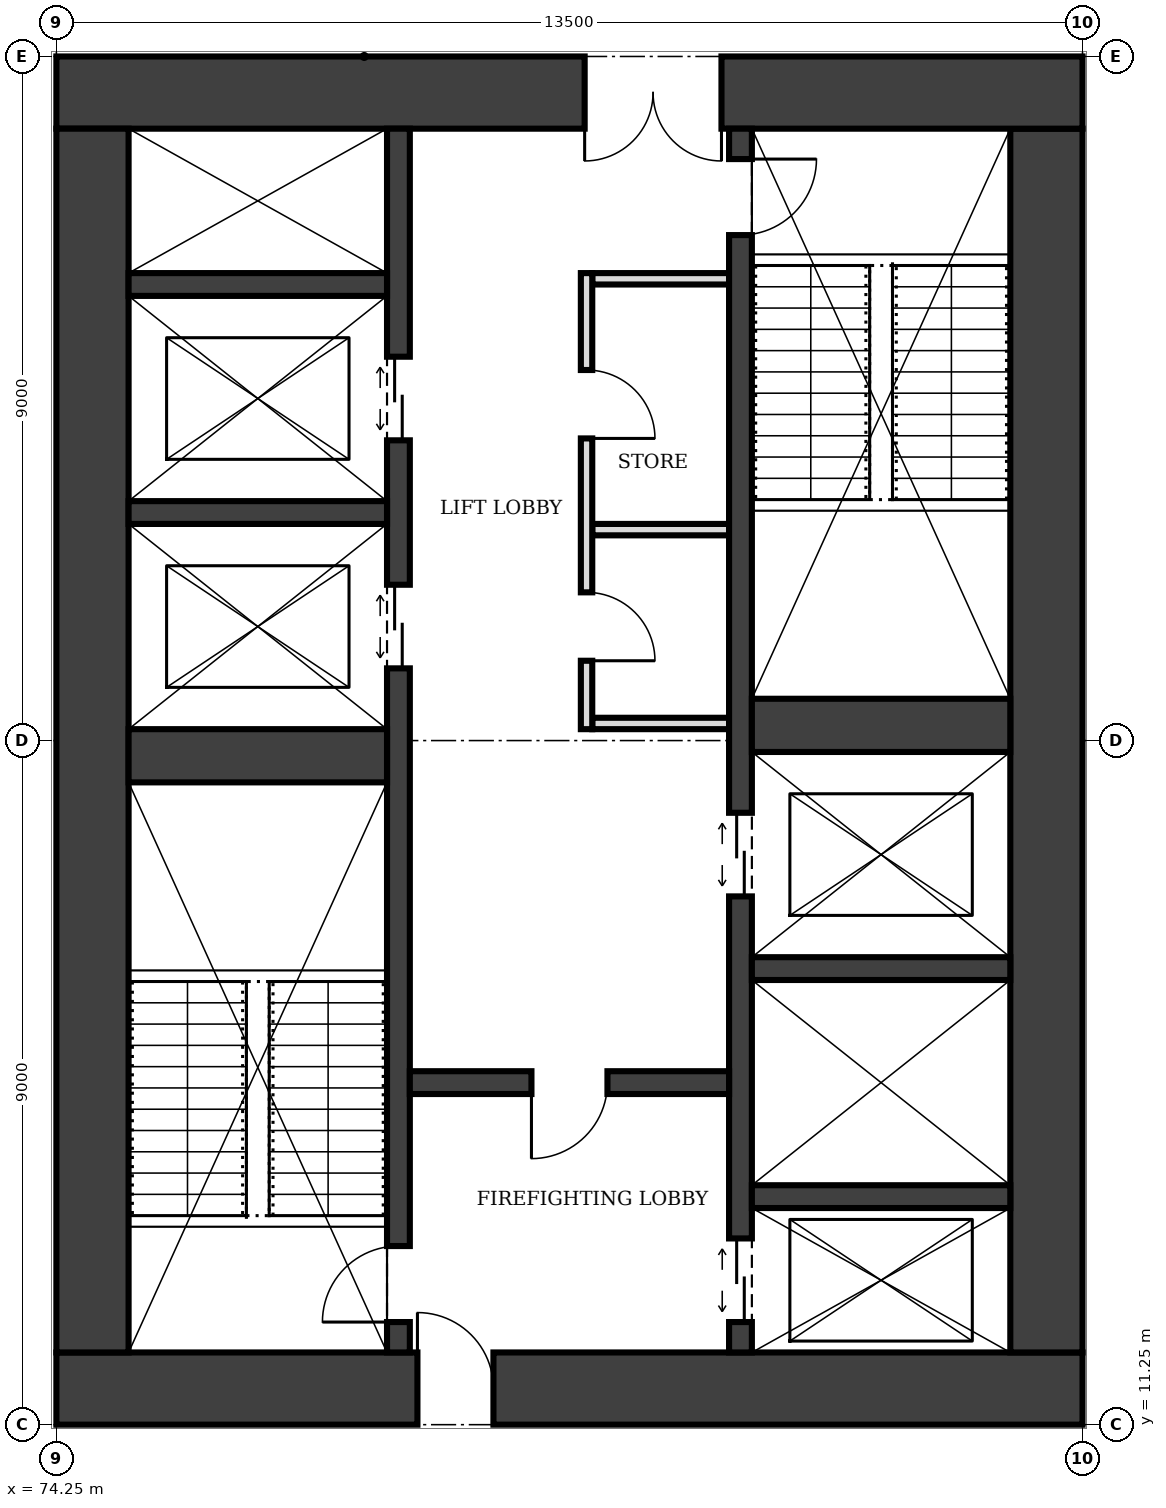
"""IFC4 building model, lengths in metres.
Left out: names, types, materials, properties, quantities, classifications, styles, units other than length and angle.
Written with IfcOpenShell. Run it as: python <this file> out.ifc"""

import sys

from ifc_helpers import new_model, si_unit, direction, frame, frame_2d, origin, place, context, subcontext, project, spatial, rectangle, extrude, element, fill, save


model = new_model("IFC4")
c1 = context("Model", 3, precision=1e-05, world=origin(), true_north=direction((0.0, 1.0)))
c2 = subcontext(c1, "Body", "Model", "MODEL_VIEW")
j1 = project(units=[si_unit("LENGTHUNIT", "METRE"), si_unit("PLANEANGLEUNIT", "RADIAN")], contexts=[c1])
p1 = place(None, origin())
s1 = spatial("IfcSite", under=j1, at=p1, CompositionType="ELEMENT")
p2 = place(p1, origin())
s2 = spatial("IfcBuilding", under=s1, at=p2, CompositionType="ELEMENT")
p3 = place(p2, frame((0.0, 0.0, 25.0)))
s3 = spatial("IfcBuildingStorey", under=s2, at=p3, CompositionType="ELEMENT", Elevation=25.0)
p4 = place(p3, frame((74.25, 11.725, 0.0), z_axis=(0.0, 0.0, 1.0), x_axis=(1.0, 0.0, 0.0)))
e1 = element("IfcWall", 1, at=p4, inside=s3, PredefinedType="SHEAR", context=c2, shape_type="SweptSolid", body=[
    extrude(rectangle(XDim=13.5, YDim=0.95, at=frame_2d((6.75, 0.0))), origin(), (0.0, 0.0, 1.0), 4.0),
])
p5 = place(p4, frame((4.75, 0.0, 0.0)))
e2 = element("IfcOpeningElement", 2, at=p5, cuts=e1, PredefinedType="OPENING", context=c2, shape_type="SweptSolid", body=[
    extrude(rectangle(XDim=1.0, YDim=2.1, at=frame_2d((0.5, 1.05))), frame((0.0, 0.485, 0.0), z_axis=(0.0, -1.0, 0.0), x_axis=(1.0, 0.0, 0.0)), (0.0, 0.0, 1.0), 0.97),
])
p6 = place(p3, frame((87.275, 12.2, 0.0), z_axis=(0.0, 0.0, 1.0), x_axis=(0.0, 1.0, 0.0)))
e3 = element("IfcWall", 3, at=p6, inside=s3, PredefinedType="SHEAR", context=c2, shape_type="SweptSolid", body=[
    extrude(rectangle(XDim=16.1, YDim=0.95, at=frame_2d((8.05, 0.0))), origin(), (0.0, 0.0, 1.0), 4.0),
])
p7 = place(p3, frame((87.75, 28.775, 0.0), z_axis=(0.0, 0.0, 1.0), x_axis=(-1.0, 0.0, 0.0)))
e4 = element("IfcWall", 4, at=p7, inside=s3, PredefinedType="SHEAR", context=c2, shape_type="SweptSolid", body=[
    extrude(rectangle(XDim=13.5, YDim=0.95, at=frame_2d((6.75, 0.0))), origin(), (0.0, 0.0, 1.0), 4.0),
])
p8 = place(p7, frame((4.75, 0.0, 0.0)))
e5 = element("IfcOpeningElement", 5, at=p8, cuts=e4, PredefinedType="OPENING", context=c2, shape_type="SweptSolid", body=[
    extrude(rectangle(XDim=1.8, YDim=2.1, at=frame_2d((0.9, 1.05))), frame((0.0, 0.485, 0.0), z_axis=(0.0, -1.0, 0.0), x_axis=(1.0, 0.0, 0.0)), (0.0, 0.0, 1.0), 0.97),
])
p9 = place(p3, frame((74.725, 28.3, 0.0), z_axis=(0.0, 0.0, 1.0), x_axis=(0.0, -1.0, 0.0)))
e6 = element("IfcWall", 6, at=p9, inside=s3, PredefinedType="SHEAR", context=c2, shape_type="SweptSolid", body=[
    extrude(rectangle(XDim=16.1, YDim=0.95, at=frame_2d((8.05, 0.0))), origin(), (0.0, 0.0, 1.0), 4.0),
])
p10 = place(p3, frame((78.75, 12.2, 0.0), z_axis=(0.0, 0.0, 1.0), x_axis=(0.0, 1.0, 0.0)))
e7 = element("IfcWall", 7, at=p10, inside=s3, PredefinedType="SHEAR", context=c2, shape_type="SweptSolid", body=[
    extrude(rectangle(XDim=16.1, YDim=0.3, at=frame_2d((8.05, 0.0))), origin(), (0.0, 0.0, 1.0), 4.0),
])
p11 = place(p10, frame((0.4, 0.0, 0.0)))
e8 = element("IfcOpeningElement", 8, at=p11, cuts=e7, PredefinedType="OPENING", context=c2, shape_type="SweptSolid", body=[
    extrude(rectangle(XDim=1.0, YDim=2.1, at=frame_2d((0.5, 1.05))), frame((0.0, 0.16, 0.0), z_axis=(0.0, -1.0, 0.0), x_axis=(1.0, 0.0, 0.0)), (0.0, 0.0, 1.0), 0.32),
])
p12 = place(p10, frame((9.0, 0.0, 0.0)))
e9 = element("IfcOpeningElement", 9, at=p12, cuts=e7, PredefinedType="OPENING", context=c2, shape_type="SweptSolid", body=[
    extrude(rectangle(XDim=1.1, YDim=2.1, at=frame_2d((0.55, 1.05))), frame((0.0, 0.16, 0.0), z_axis=(0.0, -1.0, 0.0), x_axis=(1.0, 0.0, 0.0)), (0.0, 0.0, 1.0), 0.32),
])
p13 = place(p10, frame((12.0, 0.0, 0.0)))
e10 = element("IfcOpeningElement", 10, at=p13, cuts=e7, PredefinedType="OPENING", context=c2, shape_type="SweptSolid", body=[
    extrude(rectangle(XDim=1.1, YDim=2.1, at=frame_2d((0.55, 1.05))), frame((0.0, 0.16, 0.0), z_axis=(0.0, -1.0, 0.0), x_axis=(1.0, 0.0, 0.0)), (0.0, 0.0, 1.0), 0.32),
])
p14 = place(p3, frame((83.25, 12.2, 0.0), z_axis=(0.0, 0.0, 1.0), x_axis=(0.0, 1.0, 0.0)))
e11 = element("IfcWall", 11, at=p14, inside=s3, PredefinedType="SHEAR", context=c2, shape_type="SweptSolid", body=[
    extrude(rectangle(XDim=16.1, YDim=0.3, at=frame_2d((8.05, 0.0))), origin(), (0.0, 0.0, 1.0), 4.0),
])
p15 = place(p14, frame((14.7, 0.0, 0.0)))
e12 = element("IfcOpeningElement", 12, at=p15, cuts=e11, PredefinedType="OPENING", context=c2, shape_type="SweptSolid", body=[
    extrude(rectangle(XDim=1.0, YDim=2.1, at=frame_2d((0.5, 1.05))), frame((0.0, 0.16, 0.0), z_axis=(0.0, -1.0, 0.0), x_axis=(1.0, 0.0, 0.0)), (0.0, 0.0, 1.0), 0.32),
])
p16 = place(p14, frame((0.4, 0.0, 0.0)))
e13 = element("IfcOpeningElement", 13, at=p16, cuts=e11, PredefinedType="OPENING", context=c2, shape_type="SweptSolid", body=[
    extrude(rectangle(XDim=1.1, YDim=2.1, at=frame_2d((0.55, 1.05))), frame((0.0, 0.16, 0.0), z_axis=(0.0, -1.0, 0.0), x_axis=(1.0, 0.0, 0.0)), (0.0, 0.0, 1.0), 0.32),
])
p17 = place(p14, frame((6.0, 0.0, 0.0)))
e14 = element("IfcOpeningElement", 14, at=p17, cuts=e11, PredefinedType="OPENING", context=c2, shape_type="SweptSolid", body=[
    extrude(rectangle(XDim=1.1, YDim=2.1, at=frame_2d((0.55, 1.05))), frame((0.0, 0.16, 0.0), z_axis=(0.0, -1.0, 0.0), x_axis=(1.0, 0.0, 0.0)), (0.0, 0.0, 1.0), 0.32),
])
p18 = place(p3, frame((75.2, 20.05, 0.0), z_axis=(0.0, 0.0, 1.0), x_axis=(1.0, 0.0, 0.0)))
e15 = element("IfcWall", 15, at=p18, inside=s3, PredefinedType="SHEAR", context=c2, shape_type="SweptSolid", body=[
    extrude(rectangle(XDim=3.4, YDim=0.7, at=frame_2d((1.7, 0.0))), origin(), (0.0, 0.0, 1.0), 4.0),
])
p19 = place(p3, frame((78.9, 15.75, 0.0), z_axis=(0.0, 0.0, 1.0), x_axis=(1.0, 0.0, 0.0)))
e16 = element("IfcWall", 16, at=p19, inside=s3, PredefinedType="SHEAR", context=c2, shape_type="SweptSolid", body=[
    extrude(rectangle(XDim=4.2, YDim=0.3, at=frame_2d((2.1, 0.0))), origin(), (0.0, 0.0, 1.0), 4.0),
])
p20 = place(p19, frame((1.6, 0.0, 0.0)))
e17 = element("IfcOpeningElement", 17, at=p20, cuts=e16, PredefinedType="OPENING", context=c2, shape_type="SweptSolid", body=[
    extrude(rectangle(XDim=1.0, YDim=2.1, at=frame_2d((0.5, 1.05))), frame((0.0, 0.16, 0.0), z_axis=(0.0, -1.0, 0.0), x_axis=(1.0, 0.0, 0.0)), (0.0, 0.0, 1.0), 0.32),
])
for number, where, z_axis, x_axis in (
    (18, (83.4, 14.25, 0.0), (0.0, 0.0, 1.0), (1.0, 0.0, 0.0)),
    (19, (83.4, 17.25, 0.0), (0.0, 0.0, 1.0), (1.0, 0.0, 0.0)),
):
    element("IfcWall", number, at=place(p3, frame(where, z_axis=z_axis, x_axis=x_axis)), inside=s3, PredefinedType="SHEAR", context=c2, shape_type="SweptSolid", body=[
        extrude(rectangle(XDim=3.4, YDim=0.3, at=frame_2d((1.7, 0.0))), origin(), (0.0, 0.0, 1.0), 4.0),
    ])
p21 = place(p3, frame((83.4, 20.45, 0.0), z_axis=(0.0, 0.0, 1.0), x_axis=(1.0, 0.0, 0.0)))
e20 = element("IfcWall", 20, at=p21, inside=s3, PredefinedType="SHEAR", context=c2, shape_type="SweptSolid", body=[
    extrude(rectangle(XDim=3.4, YDim=0.7, at=frame_2d((1.7, 0.0))), origin(), (0.0, 0.0, 1.0), 4.0),
])
for number, where, z_axis, x_axis in (
    (21, (75.2, 23.25, 0.0), (0.0, 0.0, 1.0), (1.0, 0.0, 0.0)),
    (22, (75.2, 26.25, 0.0), (0.0, 0.0, 1.0), (1.0, 0.0, 0.0)),
):
    element("IfcWall", number, at=place(p3, frame(where, z_axis=z_axis, x_axis=x_axis)), inside=s3, PredefinedType="SHEAR", context=c2, shape_type="SweptSolid", body=[
        extrude(rectangle(XDim=3.4, YDim=0.3, at=frame_2d((1.7, 0.0))), origin(), (0.0, 0.0, 1.0), 4.0),
    ])
p22 = place(p3, frame((81.225, 20.4, 0.0), z_axis=(0.0, 0.0, 1.0), x_axis=(0.0, 1.0, 0.0)))
e23 = element("IfcWall", 23, at=p22, inside=s3, PredefinedType="PARTITIONING", context=c2, shape_type="SweptSolid", body=[
    extrude(rectangle(XDim=6.0, YDim=0.15, at=frame_2d((3.0, 0.0))), origin(), (0.0, 0.0, 1.0), 3.75),
])
p23 = place(p22, frame((0.9, 0.0, 0.0)))
e24 = element("IfcOpeningElement", 24, at=p23, cuts=e23, PredefinedType="OPENING", context=c2, shape_type="SweptSolid", body=[
    extrude(rectangle(XDim=0.9, YDim=2.1, at=frame_2d((0.45, 1.05))), frame((0.0, 0.085, 0.0), z_axis=(0.0, -1.0, 0.0), x_axis=(1.0, 0.0, 0.0)), (0.0, 0.0, 1.0), 0.17),
])
p24 = place(p22, frame((3.825, 0.0, 0.0)))
e25 = element("IfcOpeningElement", 25, at=p24, cuts=e23, PredefinedType="OPENING", context=c2, shape_type="SweptSolid", body=[
    extrude(rectangle(XDim=0.9, YDim=2.1, at=frame_2d((0.45, 1.05))), frame((0.0, 0.085, 0.0), z_axis=(0.0, -1.0, 0.0), x_axis=(1.0, 0.0, 0.0)), (0.0, 0.0, 1.0), 0.17),
])
for number, where, z_axis, x_axis in (
    (26, (81.3, 20.475, 0.0), (0.0, 0.0, 1.0), (1.0, 0.0, 0.0)),
    (27, (81.3, 23.025, 0.0), (0.0, 0.0, 1.0), (1.0, 0.0, 0.0)),
    (28, (81.3, 26.325, 0.0), (0.0, 0.0, 1.0), (1.0, 0.0, 0.0)),
):
    element("IfcWall", number, at=place(p3, frame(where, z_axis=z_axis, x_axis=x_axis)), inside=s3, PredefinedType="PARTITIONING", context=c2, shape_type="SweptSolid", body=[
        extrude(rectangle(XDim=1.8, YDim=0.15, at=frame_2d((0.9, 0.0))), origin(), (0.0, 0.0, 1.0), 3.75),
    ])
p25 = place(p5, origin())
e29 = element("IfcDoor", 29, at=p25, inside=s3, OperationType="SINGLE_SWING_LEFT", PredefinedType="DOOR", context=c2, shape_type="SweptSolid", body=[
    extrude(rectangle(XDim=1.0, YDim=2.1, at=frame_2d((0.5, 1.05))), frame((0.0, 0.025, 0.0), z_axis=(0.0, -1.0, 0.0), x_axis=(1.0, 0.0, 0.0)), (0.0, 0.0, 1.0), 0.05),
])
fill(e2, e29)
p26 = place(p8, origin())
e30 = element("IfcDoor", 30, at=p26, inside=s3, OperationType="DOUBLE_DOOR_SINGLE_SWING", PredefinedType="DOOR", context=c2, shape_type="SweptSolid", body=[
    extrude(rectangle(XDim=1.8, YDim=2.1, at=frame_2d((0.9, 1.05))), frame((0.0, 0.025, 0.0), z_axis=(0.0, -1.0, 0.0), x_axis=(1.0, 0.0, 0.0)), (0.0, 0.0, 1.0), 0.05),
])
fill(e5, e30)
p27 = place(p20, frame((1.0, 0.0, 0.0), z_axis=(0.0, 0.0, 1.0), x_axis=(-1.0, 0.0, 0.0)))
e31 = element("IfcDoor", 31, at=p27, inside=s3, OperationType="SINGLE_SWING_RIGHT", PredefinedType="DOOR", context=c2, shape_type="SweptSolid", body=[
    extrude(rectangle(XDim=1.0, YDim=2.1, at=frame_2d((0.5, 1.05))), frame((0.0, 0.025, 0.0), z_axis=(0.0, -1.0, 0.0), x_axis=(1.0, 0.0, 0.0)), (0.0, 0.0, 1.0), 0.05),
])
fill(e17, e31)
p28 = place(p11, origin())
e32 = element("IfcDoor", 32, at=p28, inside=s3, OperationType="SINGLE_SWING_LEFT", PredefinedType="DOOR", context=c2, shape_type="SweptSolid", body=[
    extrude(rectangle(XDim=1.0, YDim=2.1, at=frame_2d((0.5, 1.05))), frame((0.0, 0.025, 0.0), z_axis=(0.0, -1.0, 0.0), x_axis=(1.0, 0.0, 0.0)), (0.0, 0.0, 1.0), 0.05),
])
fill(e8, e32)
p29 = place(p15, frame((1.0, 0.0, 0.0), z_axis=(0.0, 0.0, 1.0), x_axis=(-1.0, 0.0, 0.0)))
e33 = element("IfcDoor", 33, at=p29, inside=s3, OperationType="SINGLE_SWING_LEFT", PredefinedType="DOOR", context=c2, shape_type="SweptSolid", body=[
    extrude(rectangle(XDim=1.0, YDim=2.1, at=frame_2d((0.5, 1.05))), frame((0.0, 0.025, 0.0), z_axis=(0.0, -1.0, 0.0), x_axis=(1.0, 0.0, 0.0)), (0.0, 0.0, 1.0), 0.05),
])
fill(e12, e33)
p30 = place(p16, origin())
e34 = element("IfcDoor", 34, at=p30, inside=s3, OperationType="DOUBLE_DOOR_SLIDING", PredefinedType="DOOR", context=c2, shape_type="SweptSolid", body=[
    extrude(rectangle(XDim=1.1, YDim=2.1, at=frame_2d((0.55, 1.05))), frame((0.0, 0.025, 0.0), z_axis=(0.0, -1.0, 0.0), x_axis=(1.0, 0.0, 0.0)), (0.0, 0.0, 1.0), 0.05),
])
fill(e13, e34)
p31 = place(p12, origin())
e35 = element("IfcDoor", 35, at=p31, inside=s3, OperationType="DOUBLE_DOOR_SLIDING", PredefinedType="DOOR", context=c2, shape_type="SweptSolid", body=[
    extrude(rectangle(XDim=1.1, YDim=2.1, at=frame_2d((0.55, 1.05))), frame((0.0, 0.025, 0.0), z_axis=(0.0, -1.0, 0.0), x_axis=(1.0, 0.0, 0.0)), (0.0, 0.0, 1.0), 0.05),
])
fill(e9, e35)
p32 = place(p13, origin())
e36 = element("IfcDoor", 36, at=p32, inside=s3, OperationType="DOUBLE_DOOR_SLIDING", PredefinedType="DOOR", context=c2, shape_type="SweptSolid", body=[
    extrude(rectangle(XDim=1.1, YDim=2.1, at=frame_2d((0.55, 1.05))), frame((0.0, 0.025, 0.0), z_axis=(0.0, -1.0, 0.0), x_axis=(1.0, 0.0, 0.0)), (0.0, 0.0, 1.0), 0.05),
])
fill(e10, e36)
p33 = place(p17, origin())
e37 = element("IfcDoor", 37, at=p33, inside=s3, OperationType="DOUBLE_DOOR_SLIDING", PredefinedType="DOOR", context=c2, shape_type="SweptSolid", body=[
    extrude(rectangle(XDim=1.1, YDim=2.1, at=frame_2d((0.55, 1.05))), frame((0.0, 0.025, 0.0), z_axis=(0.0, -1.0, 0.0), x_axis=(1.0, 0.0, 0.0)), (0.0, 0.0, 1.0), 0.05),
])
fill(e14, e37)
p34 = place(p23, frame((0.9, 0.0, 0.0), z_axis=(0.0, 0.0, 1.0), x_axis=(-1.0, 0.0, 0.0)))
e38 = element("IfcDoor", 38, at=p34, inside=s3, OperationType="SINGLE_SWING_RIGHT", PredefinedType="DOOR", context=c2, shape_type="SweptSolid", body=[
    extrude(rectangle(XDim=0.9, YDim=2.1, at=frame_2d((0.45, 1.05))), frame((0.0, 0.025, 0.0), z_axis=(0.0, -1.0, 0.0), x_axis=(1.0, 0.0, 0.0)), (0.0, 0.0, 1.0), 0.05),
])
fill(e24, e38)
p35 = place(p24, frame((0.9, 0.0, 0.0), z_axis=(0.0, 0.0, 1.0), x_axis=(-1.0, 0.0, 0.0)))
e39 = element("IfcDoor", 39, at=p35, inside=s3, OperationType="SINGLE_SWING_RIGHT", PredefinedType="DOOR", context=c2, shape_type="SweptSolid", body=[
    extrude(rectangle(XDim=0.9, YDim=2.1, at=frame_2d((0.45, 1.05))), frame((0.0, 0.025, 0.0), z_axis=(0.0, -1.0, 0.0), x_axis=(1.0, 0.0, 0.0)), (0.0, 0.0, 1.0), 0.05),
])
fill(e25, e39)
save(model, sys.argv[1])
